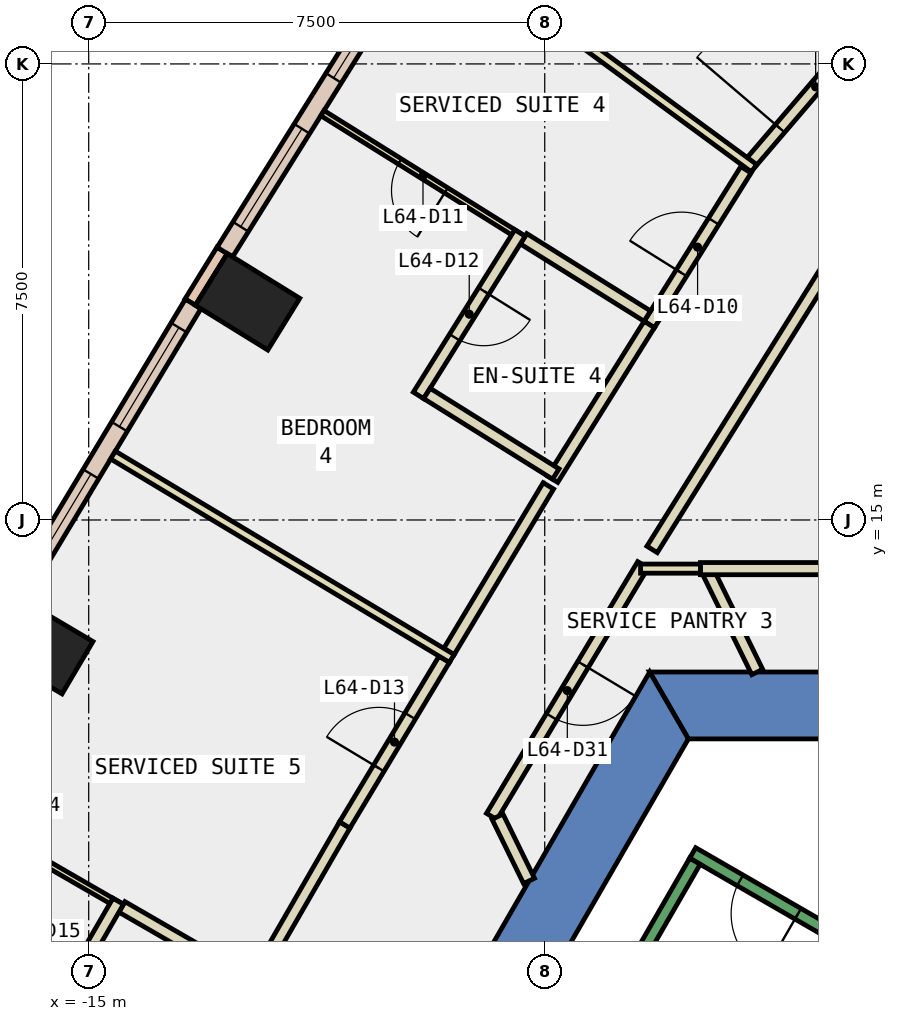
"""IFC4 building model, lengths in metres.
Left out: names, types, materials, properties, quantities, classifications, styles, units other than length and angle.
Written with IfcOpenShell. Run it as: python <this file> out.ifc"""

import sys

from ifc_helpers import new_model, si_unit, direction, frame, frame_2d, origin, origin_2d, place, context, subcontext, project, spatial, polyline, rectangle, outline, extrude, element, fill, save


model = new_model("IFC4")
c1 = context("Model", 3, precision=1e-05, world=origin(), true_north=direction((0.0, 1.0)))
c2 = subcontext(c1, "Body", "Model", "MODEL_VIEW")
j1 = project(units=[si_unit("LENGTHUNIT", "METRE"), si_unit("PLANEANGLEUNIT", "RADIAN")], contexts=[c1])
p1 = place(None, origin())
s1 = spatial("IfcSite", under=j1, at=p1, CompositionType="ELEMENT")
p2 = place(p1, origin())
s2 = spatial("IfcBuilding", under=s1, at=p2, CompositionType="ELEMENT")
p3 = place(p2, frame((0.0, 0.0, 277.4)))
s3 = spatial("IfcBuildingStorey", under=s2, at=p3, CompositionType="ELEMENT", Elevation=277.4)
for number, where, z_axis, x_axis in (
    (1, (-12.387, 18.588, -0.34), (0.0, 0.0, 1.0), (0.526, 0.851, 0.0)),
    (2, (-15.787, 12.927, -0.34), (0.0, 0.0, 1.0), (0.509, 0.861, 0.0)),
):
    element("IfcColumn", number, at=place(p3, frame(where, z_axis=z_axis, x_axis=x_axis)), inside=s3, PredefinedType="COLUMN", context=c2, shape_type="SweptSolid", body=[
        extrude(rectangle(XDim=1.0, YDim=1.4, at=origin_2d()), origin(), (0.0, 0.0, 1.0), 3.34),
    ])
p4 = place(p3, frame((0.0, 0.0, -0.34)))
e3 = element("IfcWall", 3, at=p4, inside=s3, PredefinedType="SHEAR", context=c2, shape_type="SweptSolid", body=[
    extrude(outline(polyline([(5.774, 12.5), (-5.774, 12.5), (-5.138, 11.4), (5.138, 11.4), (5.774, 12.5)])), origin(), (0.0, 0.0, 1.0), 3.34),
])
p5 = place(p3, frame((0.0, 0.0, -0.34)))
e4 = element("IfcWall", 4, at=p5, inside=s3, PredefinedType="SHEAR", context=c2, shape_type="SweptSolid", body=[
    extrude(outline(polyline([(-10.535, 4.253), (-9.583, 3.703), (-5.138, 11.4), (-5.774, 12.5), (-10.535, 4.253)])), origin(), (0.0, 0.0, 1.0), 3.34),
])
p6 = place(p3, frame((-12.805, 19.434, 0.0), z_axis=(0.0, 0.0, 1.0), x_axis=(-0.525825307325, -0.850592585306, 0.0)))
e5 = element("IfcWall", 5, at=p6, inside=s3, PredefinedType="STANDARD", context=c2, shape_type="SweptSolid", body=[
    extrude(rectangle(XDim=1.0, YDim=0.2, at=frame_2d((0.5, 0.0))), origin(), (0.0, 0.0, 1.0), 3.0),
])
p7 = place(p3, frame((-9.704, 24.297, 0.0), z_axis=(0.0, 0.0, 1.0), x_axis=(-0.529915244244, -0.848050608111, 0.0)))
e6 = element("IfcWall", 6, at=p7, inside=s3, PredefinedType="STANDARD", context=c2, shape_type="SweptSolid", body=[
    extrude(rectangle(XDim=5.769, YDim=0.3, at=frame_2d((2.884, 0.0))), origin(), (0.0, 0.0, 1.0), 3.0),
])
p8 = place(p7, frame((0.492, 0.0, 0.9)))
e7 = element("IfcOpeningElement", 7, at=p8, cuts=e6, PredefinedType="OPENING", context=c2, shape_type="SweptSolid", body=[
    extrude(rectangle(XDim=1.9, YDim=2.0, at=frame_2d((0.95, 1.0))), frame((0.0, 0.16, 0.0), z_axis=(0.0, -1.0, 0.0), x_axis=(1.0, 0.0, 0.0)), (0.0, 0.0, 1.0), 0.32),
])
p9 = place(p7, frame((3.376, 0.0, 0.9)))
e8 = element("IfcOpeningElement", 8, at=p9, cuts=e6, PredefinedType="OPENING", context=c2, shape_type="SweptSolid", body=[
    extrude(rectangle(XDim=1.9, YDim=2.0, at=frame_2d((0.95, 1.0))), frame((0.0, 0.16, 0.0), z_axis=(0.0, -1.0, 0.0), x_axis=(1.0, 0.0, 0.0)), (0.0, 0.0, 1.0), 0.32),
])
p10 = place(p3, frame((-13.282, 18.554, 0.0), z_axis=(0.0, 0.0, 1.0), x_axis=(-0.515006791362, -0.857186096977, 0.0)))
e9 = element("IfcWall", 9, at=p10, inside=s3, PredefinedType="STANDARD", context=c2, shape_type="SweptSolid", body=[
    extrude(rectangle(XDim=5.619, YDim=0.3, at=frame_2d((2.81, 0.0))), origin(), (0.0, 0.0, 1.0), 3.0),
])
p11 = place(p10, frame((0.455, 0.0, 0.9)))
e10 = element("IfcOpeningElement", 10, at=p11, cuts=e9, PredefinedType="OPENING", context=c2, shape_type="SweptSolid", body=[
    extrude(rectangle(XDim=1.9, YDim=2.0, at=frame_2d((0.95, 1.0))), frame((0.0, 0.16, 0.0), z_axis=(0.0, -1.0, 0.0), x_axis=(1.0, 0.0, 0.0)), (0.0, 0.0, 1.0), 0.32),
])
p12 = place(p10, frame((3.265, 0.0, 0.9)))
e11 = element("IfcOpeningElement", 11, at=p12, cuts=e9, PredefinedType="OPENING", context=c2, shape_type="SweptSolid", body=[
    extrude(rectangle(XDim=1.9, YDim=2.0, at=frame_2d((0.95, 1.0))), frame((0.0, 0.16, 0.0), z_axis=(0.0, -1.0, 0.0), x_axis=(1.0, 0.0, 0.0)), (0.0, 0.0, 1.0), 0.32),
])
p13 = place(p3, frame((-4.005, 12.5, 0.0), z_axis=(0.0, 0.0, 1.0), x_axis=(-0.440355460167, 0.89782351757, 0.0)))
e12 = element("IfcWall", 12, at=p13, inside=s3, PredefinedType="PARTITIONING", context=c2, shape_type="SweptSolid", body=[
    extrude(rectangle(XDim=1.869, YDim=0.2, at=frame_2d((0.935, 0.0))), origin(), (0.0, 0.0, 1.0), 3.0),
])
p14 = place(p3, frame((-5.885, 14.264, 0.0), z_axis=(0.0, 0.0, 1.0), x_axis=(-0.514971458129, -0.857207324579, 0.0)))
e13 = element("IfcWall", 13, at=p14, inside=s3, PredefinedType="PARTITIONING", context=c2, shape_type="SweptSolid", body=[
    extrude(rectangle(XDim=4.83, YDim=0.2, at=frame_2d((2.415, 0.0))), origin(), (0.0, 0.0, 1.0), 3.0),
])
p15 = place(p14, frame((1.915, 0.0, 0.0)))
e14 = element("IfcOpeningElement", 14, at=p15, cuts=e13, PredefinedType="OPENING", context=c2, shape_type="SweptSolid", body=[
    extrude(rectangle(XDim=1.0, YDim=2.1, at=frame_2d((0.5, 1.05))), frame((0.0, 0.11, 0.0), z_axis=(0.0, -1.0, 0.0), x_axis=(1.0, 0.0, 0.0)), (0.0, 0.0, 1.0), 0.22),
])
p16 = place(p3, frame((-8.276, 10.12, 0.0), z_axis=(0.0, 0.0, 1.0), x_axis=(0.440226122236, -0.897886942382, 0.0)))
e15 = element("IfcWall", 15, at=p16, inside=s3, PredefinedType="PARTITIONING", context=c2, shape_type="SweptSolid", body=[
    extrude(rectangle(XDim=1.176, YDim=0.2, at=frame_2d((0.588, 0.0))), origin(), (0.0, 0.0, 1.0), 3.0),
])
p17 = place(p3, frame((-4.939, 14.2, 0.0), z_axis=(0.0, 0.0, 1.0), x_axis=(1.0, 0.0, 0.0)))
e16 = element("IfcWall", 16, at=p17, inside=s3, PredefinedType="PARTITIONING", context=c2, shape_type="SweptSolid", body=[
    extrude(rectangle(XDim=4.539, YDim=0.2, at=frame_2d((2.27, 0.0))), origin(), (0.0, 0.0, 1.0), 3.0),
])
p18 = place(p3, frame((-2.469, 19.742, 0.0), z_axis=(0.0, 0.0, 1.0), x_axis=(-0.529852912827, -0.848089553508, 0.0)))
e17 = element("IfcWall", 17, at=p18, inside=s3, PredefinedType="PARTITIONING", context=c2, shape_type="SweptSolid", body=[
    extrude(rectangle(XDim=6.162, YDim=0.2, at=frame_2d((3.081, 0.0))), origin(), (0.0, 0.0, 1.0), 3.0),
])
p19 = place(p3, frame((-4.155, 20.825, 0.0), z_axis=(0.0, 0.0, 1.0), x_axis=(0.650396970678, 0.75959448427, 0.0)))
e18 = element("IfcWall", 18, at=p19, inside=s3, PredefinedType="PARTITIONING", context=c2, shape_type="SweptSolid", body=[
    extrude(rectangle(XDim=3.416, YDim=0.2, at=frame_2d((1.708, 0.0))), origin(), (0.0, 0.0, 1.0), 3.0),
])
p20 = place(p19, frame((0.808, 0.0, 0.0)))
e19 = element("IfcOpeningElement", 19, at=p20, cuts=e18, PredefinedType="OPENING", context=c2, shape_type="SweptSolid", body=[
    extrude(rectangle(XDim=1.8, YDim=2.1, at=frame_2d((0.9, 1.05))), frame((0.0, 0.11, 0.0), z_axis=(0.0, -1.0, 0.0), x_axis=(1.0, 0.0, 0.0)), (0.0, 0.0, 1.0), 0.22),
])
p21 = place(p3, frame((-5.781, 18.215, 0.0), z_axis=(0.0, 0.0, 1.0), x_axis=(0.530028199927, 0.847980015851, 0.0)))
e20 = element("IfcWall", 20, at=p21, inside=s3, PredefinedType="PARTITIONING", context=c2, shape_type="SweptSolid", body=[
    extrude(rectangle(XDim=3.0, YDim=0.2, at=frame_2d((1.5, 0.0))), origin(), (0.0, 0.0, 1.0), 3.0),
])
p22 = place(p21, frame((1.0, 0.0, 0.0)))
e21 = element("IfcOpeningElement", 21, at=p22, cuts=e20, PredefinedType="OPENING", context=c2, shape_type="SweptSolid", body=[
    extrude(rectangle(XDim=1.0, YDim=2.1, at=frame_2d((0.5, 1.05))), frame((0.0, 0.11, 0.0), z_axis=(0.0, -1.0, 0.0), x_axis=(1.0, 0.0, 0.0)), (0.0, 0.0, 1.0), 0.22),
])
p23 = place(p3, frame((-9.075, 12.837, 0.0), z_axis=(0.0, 0.0, 1.0), x_axis=(0.514620055475, 0.857418333431, 0.0)))
e22 = element("IfcWall", 22, at=p23, inside=s3, PredefinedType="PARTITIONING", context=c2, shape_type="SweptSolid", body=[
    extrude(rectangle(XDim=3.177, YDim=0.2, at=frame_2d((1.588, 0.0))), origin(), (0.0, 0.0, 1.0), 3.0),
])
p24 = place(p3, frame((-7.371, 15.671, 0.0), z_axis=(0.0, 0.0, 1.0), x_axis=(0.529991625428, 0.84800287557, 0.0)))
e23 = element("IfcWall", 23, at=p24, inside=s3, PredefinedType="PARTITIONING", context=c2, shape_type="SweptSolid", body=[
    extrude(rectangle(XDim=3.0, YDim=0.2, at=frame_2d((1.5, 0.0))), origin(), (0.0, 0.0, 1.0), 3.0),
])
p25 = place(p3, frame((-12.338, 7.3, 0.0), z_axis=(0.0, 0.0, 1.0), x_axis=(0.4996633593, 0.866219676164, 0.0)))
e24 = element("IfcWall", 24, at=p25, inside=s3, PredefinedType="PARTITIONING", context=c2, shape_type="SweptSolid", body=[
    extrude(rectangle(XDim=3.1, YDim=0.2, at=frame_2d((1.55, 0.0))), origin(), (0.0, 0.0, 1.0), 3.0),
])
p26 = place(p3, frame((-10.789, 9.985, 0.0), z_axis=(0.0, 0.0, 1.0), x_axis=(0.51487988517, 0.857262330823, 0.0)))
e25 = element("IfcWall", 25, at=p26, inside=s3, PredefinedType="PARTITIONING", context=c2, shape_type="SweptSolid", body=[
    extrude(rectangle(XDim=3.177, YDim=0.2, at=frame_2d((1.589, 0.0))), origin(), (0.0, 0.0, 1.0), 3.0),
])
p27 = place(p26, frame((1.089, 0.0, 0.0)))
e26 = element("IfcOpeningElement", 26, at=p27, cuts=e25, PredefinedType="OPENING", context=c2, shape_type="SweptSolid", body=[
    extrude(rectangle(XDim=1.0, YDim=2.1, at=frame_2d((0.5, 1.05))), frame((0.0, 0.11, 0.0), z_axis=(0.0, -1.0, 0.0), x_axis=(1.0, 0.0, 0.0)), (0.0, 0.0, 1.0), 0.22),
])
p28 = place(p3, frame((-4.939, 14.2, 0.0), z_axis=(0.0, 0.0, 1.0), x_axis=(-1.0, 0.0, 0.0)))
e27 = element("IfcWall", 27, at=p28, inside=s3, PredefinedType="PARTITIONING", context=c2, shape_type="SweptSolid", body=[
    extrude(rectangle(XDim=0.985, YDim=0.15, at=frame_2d((0.493, 0.0))), origin(), (0.0, 0.0, 1.0), 3.0),
])
p29 = place(p3, frame((-4.058, 20.785, 0.0), z_axis=(0.0, 0.0, 1.0), x_axis=(-0.805947688418, 0.591986759593, 0.0)))
e28 = element("IfcWall", 28, at=p29, inside=s3, PredefinedType="PARTITIONING", context=c2, shape_type="SweptSolid", body=[
    extrude(rectangle(XDim=5.196, YDim=0.15, at=frame_2d((2.598, 0.0))), origin(), (0.0, 0.0, 1.0), 3.0),
])
p30 = place(p3, frame((-7.848, 19.625, 0.0), z_axis=(0.0, 0.0, 1.0), x_axis=(-0.848188150314, 0.529695064794, 0.0)))
e29 = element("IfcWall", 29, at=p30, inside=s3, PredefinedType="PARTITIONING", context=c2, shape_type="SweptSolid", body=[
    extrude(rectangle(XDim=3.9, YDim=0.1, at=frame_2d((1.95, 0.0))), origin(), (0.0, 0.0, 1.0), 3.0),
])
p31 = place(p30, frame((1.5, 0.0, 0.0)))
e30 = element("IfcOpeningElement", 30, at=p31, cuts=e29, PredefinedType="OPENING", context=c2, shape_type="SweptSolid", body=[
    extrude(rectangle(XDim=0.9, YDim=2.1, at=frame_2d((0.45, 1.05))), frame((0.0, 0.06, 0.0), z_axis=(0.0, -1.0, 0.0), x_axis=(1.0, 0.0, 0.0)), (0.0, 0.0, 1.0), 0.12),
])
p32 = place(p3, frame((-5.813, 18.353, 0.0), z_axis=(0.0, 0.0, 1.0), x_axis=(-0.847969725239, 0.530044663287, 0.0)))
e31 = element("IfcWall", 31, at=p32, inside=s3, PredefinedType="PARTITIONING", context=c2, shape_type="SweptSolid", body=[
    extrude(rectangle(XDim=2.4, YDim=0.2, at=frame_2d((1.2, 0.0))), origin(), (0.0, 0.0, 1.0), 3.0),
])
p33 = place(p3, frame((-7.907, 19.72, 0.0), z_axis=(0.0, 0.0, 1.0), x_axis=(-0.529915322147, -0.848050559433, 0.0)))
e32 = element("IfcWall", 32, at=p33, inside=s3, PredefinedType="PARTITIONING", context=c2, shape_type="SweptSolid", body=[
    extrude(rectangle(XDim=3.149, YDim=0.2, at=frame_2d((1.575, 0.0))), origin(), (0.0, 0.0, 1.0), 3.0),
])
p34 = place(p33, frame((1.125, 0.0, 0.0)))
e33 = element("IfcOpeningElement", 33, at=p34, cuts=e32, PredefinedType="OPENING", context=c2, shape_type="SweptSolid", body=[
    extrude(rectangle(XDim=0.9, YDim=2.1, at=frame_2d((0.45, 1.05))), frame((0.0, 0.11, 0.0), z_axis=(0.0, -1.0, 0.0), x_axis=(1.0, 0.0, 0.0)), (0.0, 0.0, 1.0), 0.22),
])
p35 = place(p3, frame((-9.438, 17.081, 0.0), z_axis=(0.0, 0.0, 1.0), x_axis=(0.847992817371, -0.530007718516, 0.0)))
e34 = element("IfcWall", 34, at=p35, inside=s3, PredefinedType="PARTITIONING", context=c2, shape_type="SweptSolid", body=[
    extrude(rectangle(XDim=2.5, YDim=0.2, at=frame_2d((1.25, 0.0))), origin(), (0.0, 0.0, 1.0), 3.0),
])
p36 = place(p3, frame((-9.028, 12.722, 0.0), z_axis=(0.0, 0.0, 1.0), x_axis=(-0.857330501016, 0.514766366449, 0.0)))
e35 = element("IfcWall", 35, at=p36, inside=s3, PredefinedType="PARTITIONING", context=c2, shape_type="SweptSolid", body=[
    extrude(rectangle(XDim=6.5, YDim=0.15, at=frame_2d((3.25, 0.0))), origin(), (0.0, 0.0, 1.0), 3.0),
])
p37 = place(p3, frame((-14.454, 8.637, 0.0), z_axis=(0.0, 0.0, 1.0), x_axis=(-0.865995823051, 0.500051231833, 0.0)))
e36 = element("IfcWall", 36, at=p37, inside=s3, PredefinedType="PARTITIONING", context=c2, shape_type="SweptSolid", body=[
    extrude(rectangle(XDim=3.899, YDim=0.1, at=frame_2d((1.95, 0.0))), origin(), (0.0, 0.0, 1.0), 3.0),
])
p38 = place(p37, frame((1.5, 0.0, 0.0)))
e37 = element("IfcOpeningElement", 37, at=p38, cuts=e36, PredefinedType="OPENING", context=c2, shape_type="SweptSolid", body=[
    extrude(rectangle(XDim=0.9, YDim=2.1, at=frame_2d((0.45, 1.05))), frame((0.0, 0.06, 0.0), z_axis=(0.0, -1.0, 0.0), x_axis=(1.0, 0.0, 0.0)), (0.0, 0.0, 1.0), 0.12),
])
p39 = place(p3, frame((-12.375, 7.437, 0.0), z_axis=(0.0, 0.0, 1.0), x_axis=(-0.866100915363, 0.499869187296, 0.0)))
e38 = element("IfcWall", 38, at=p39, inside=s3, PredefinedType="PARTITIONING", context=c2, shape_type="SweptSolid", body=[
    extrude(rectangle(XDim=2.401, YDim=0.2, at=frame_2d((1.2, 0.0))), origin(), (0.0, 0.0, 1.0), 3.0),
])
p40 = place(p3, frame((-14.515, 8.73, 0.0), z_axis=(0.0, 0.0, 1.0), x_axis=(-0.500039995618, -0.866002311072, 0.0)))
e39 = element("IfcWall", 39, at=p40, inside=s3, PredefinedType="PARTITIONING", context=c2, shape_type="SweptSolid", body=[
    extrude(rectangle(XDim=3.15, YDim=0.2, at=frame_2d((1.575, 0.0))), origin(), (0.0, 0.0, 1.0), 3.0),
])
p41 = place(p40, frame((1.125, 0.0, 0.0)))
e40 = element("IfcOpeningElement", 40, at=p41, cuts=e39, PredefinedType="OPENING", context=c2, shape_type="SweptSolid", body=[
    extrude(rectangle(XDim=0.9, YDim=2.1, at=frame_2d((0.45, 1.05))), frame((0.0, 0.11, 0.0), z_axis=(0.0, -1.0, 0.0), x_axis=(1.0, 0.0, 0.0)), (0.0, 0.0, 1.0), 0.22),
])
p42 = place(p3, frame((-1.256, 7.324, 0.0), z_axis=(0.0, 0.0, 1.0), x_axis=(-0.866046073146, 0.499964197906, 0.0)))
e41 = element("IfcWall", 41, at=p42, inside=s3, PredefinedType="STANDARD", context=c2, shape_type="SweptSolid", body=[
    extrude(rectangle(XDim=4.4, YDim=0.2, at=frame_2d((2.2, 0.0))), origin(), (0.0, 0.0, 1.0), 3.0),
])
p43 = place(p42, frame((2.4, 0.0, 0.0)))
e42 = element("IfcOpeningElement", 42, at=p43, cuts=e41, PredefinedType="OPENING", context=c2, shape_type="SweptSolid", body=[
    extrude(rectangle(XDim=1.1, YDim=2.2, at=frame_2d((0.55, 1.1))), frame((0.0, 0.11, 0.0), z_axis=(0.0, -1.0, 0.0), x_axis=(1.0, 0.0, 0.0)), (0.0, 0.0, 1.0), 0.22),
])
p44 = place(p3, frame((-5.03, 9.388, 0.0), z_axis=(0.0, 0.0, 1.0), x_axis=(-0.499978703459, -0.866037698999, 0.0)))
e43 = element("IfcWall", 43, at=p44, inside=s3, PredefinedType="STANDARD", context=c2, shape_type="SweptSolid", body=[
    extrude(rectangle(XDim=6.9, YDim=0.2, at=frame_2d((3.45, 0.0))), origin(), (0.0, 0.0, 1.0), 3.0),
])
p45 = place(p8, origin())
e44 = element("IfcWindow", 44, at=p45, inside=s3, PartitioningType="SINGLE_PANEL", PredefinedType="WINDOW", context=c2, shape_type="SweptSolid", body=[
    extrude(rectangle(XDim=1.9, YDim=2.0, at=frame_2d((0.95, 1.0))), frame((0.0, 0.03, 0.0), z_axis=(0.0, -1.0, 0.0), x_axis=(1.0, 0.0, 0.0)), (0.0, 0.0, 1.0), 0.06),
])
fill(e7, e44)
p46 = place(p9, origin())
e45 = element("IfcWindow", 45, at=p46, inside=s3, PartitioningType="SINGLE_PANEL", PredefinedType="WINDOW", context=c2, shape_type="SweptSolid", body=[
    extrude(rectangle(XDim=1.9, YDim=2.0, at=frame_2d((0.95, 1.0))), frame((0.0, 0.03, 0.0), z_axis=(0.0, -1.0, 0.0), x_axis=(1.0, 0.0, 0.0)), (0.0, 0.0, 1.0), 0.06),
])
fill(e8, e45)
p47 = place(p11, origin())
e46 = element("IfcWindow", 46, at=p47, inside=s3, PartitioningType="SINGLE_PANEL", PredefinedType="WINDOW", context=c2, shape_type="SweptSolid", body=[
    extrude(rectangle(XDim=1.9, YDim=2.0, at=frame_2d((0.95, 1.0))), frame((0.0, 0.03, 0.0), z_axis=(0.0, -1.0, 0.0), x_axis=(1.0, 0.0, 0.0)), (0.0, 0.0, 1.0), 0.06),
])
fill(e10, e46)
p48 = place(p12, origin())
e47 = element("IfcWindow", 47, at=p48, inside=s3, PartitioningType="SINGLE_PANEL", PredefinedType="WINDOW", context=c2, shape_type="SweptSolid", body=[
    extrude(rectangle(XDim=1.9, YDim=2.0, at=frame_2d((0.95, 1.0))), frame((0.0, 0.03, 0.0), z_axis=(0.0, -1.0, 0.0), x_axis=(1.0, 0.0, 0.0)), (0.0, 0.0, 1.0), 0.06),
])
fill(e11, e47)
p49 = place(p22, origin())
e48 = element("IfcDoor", 48, at=p49, inside=s3, OperationType="SINGLE_SWING_RIGHT", PredefinedType="DOOR", context=c2, shape_type="SweptSolid", body=[
    extrude(rectangle(XDim=1.0, YDim=2.1, at=frame_2d((0.5, 1.05))), frame((0.0, 0.025, 0.0), z_axis=(0.0, -1.0, 0.0), x_axis=(1.0, 0.0, 0.0)), (0.0, 0.0, 1.0), 0.05),
])
fill(e21, e48)
p50 = place(p31, origin())
e49 = element("IfcDoor", 49, at=p50, inside=s3, OperationType="SINGLE_SWING_RIGHT", PredefinedType="DOOR", context=c2, shape_type="SweptSolid", body=[
    extrude(rectangle(XDim=0.9, YDim=2.1, at=frame_2d((0.45, 1.05))), frame((0.0, 0.025, 0.0), z_axis=(0.0, -1.0, 0.0), x_axis=(1.0, 0.0, 0.0)), (0.0, 0.0, 1.0), 0.05),
])
fill(e30, e49)
p51 = place(p34, origin())
e50 = element("IfcDoor", 50, at=p51, inside=s3, OperationType="SINGLE_SWING_LEFT", PredefinedType="DOOR", context=c2, shape_type="SweptSolid", body=[
    extrude(rectangle(XDim=0.9, YDim=2.1, at=frame_2d((0.45, 1.05))), frame((0.0, 0.025, 0.0), z_axis=(0.0, -1.0, 0.0), x_axis=(1.0, 0.0, 0.0)), (0.0, 0.0, 1.0), 0.05),
])
fill(e33, e50)
p52 = place(p27, origin())
e51 = element("IfcDoor", 51, at=p52, inside=s3, OperationType="SINGLE_SWING_RIGHT", PredefinedType="DOOR", context=c2, shape_type="SweptSolid", body=[
    extrude(rectangle(XDim=1.0, YDim=2.1, at=frame_2d((0.5, 1.05))), frame((0.0, 0.025, 0.0), z_axis=(0.0, -1.0, 0.0), x_axis=(1.0, 0.0, 0.0)), (0.0, 0.0, 1.0), 0.05),
])
fill(e26, e51)
p53 = place(p20, origin())
e52 = element("IfcDoor", 52, at=p53, inside=s3, OperationType="DOUBLE_DOOR_SINGLE_SWING", PredefinedType="DOOR", context=c2, shape_type="SweptSolid", body=[
    extrude(rectangle(XDim=1.8, YDim=2.1, at=frame_2d((0.9, 1.05))), frame((0.0, 0.025, 0.0), z_axis=(0.0, -1.0, 0.0), x_axis=(1.0, 0.0, 0.0)), (0.0, 0.0, 1.0), 0.05),
])
fill(e19, e52)
p54 = place(p15, origin())
e53 = element("IfcDoor", 53, at=p54, inside=s3, OperationType="SINGLE_SWING_LEFT", PredefinedType="DOOR", context=c2, shape_type="SweptSolid", body=[
    extrude(rectangle(XDim=1.0, YDim=2.1, at=frame_2d((0.5, 1.05))), frame((0.0, 0.025, 0.0), z_axis=(0.0, -1.0, 0.0), x_axis=(1.0, 0.0, 0.0)), (0.0, 0.0, 1.0), 0.05),
])
fill(e14, e53)
p55 = place(p43, origin())
e54 = element("IfcDoor", 54, at=p55, inside=s3, OperationType="SINGLE_SWING_LEFT", PredefinedType="DOOR", context=c2, shape_type="SweptSolid", body=[
    extrude(rectangle(XDim=1.1, YDim=2.2, at=frame_2d((0.55, 1.1))), frame((0.0, 0.025, 0.0), z_axis=(0.0, -1.0, 0.0), x_axis=(1.0, 0.0, 0.0)), (0.0, 0.0, 1.0), 0.05),
])
fill(e42, e54)
save(model, sys.argv[1])
